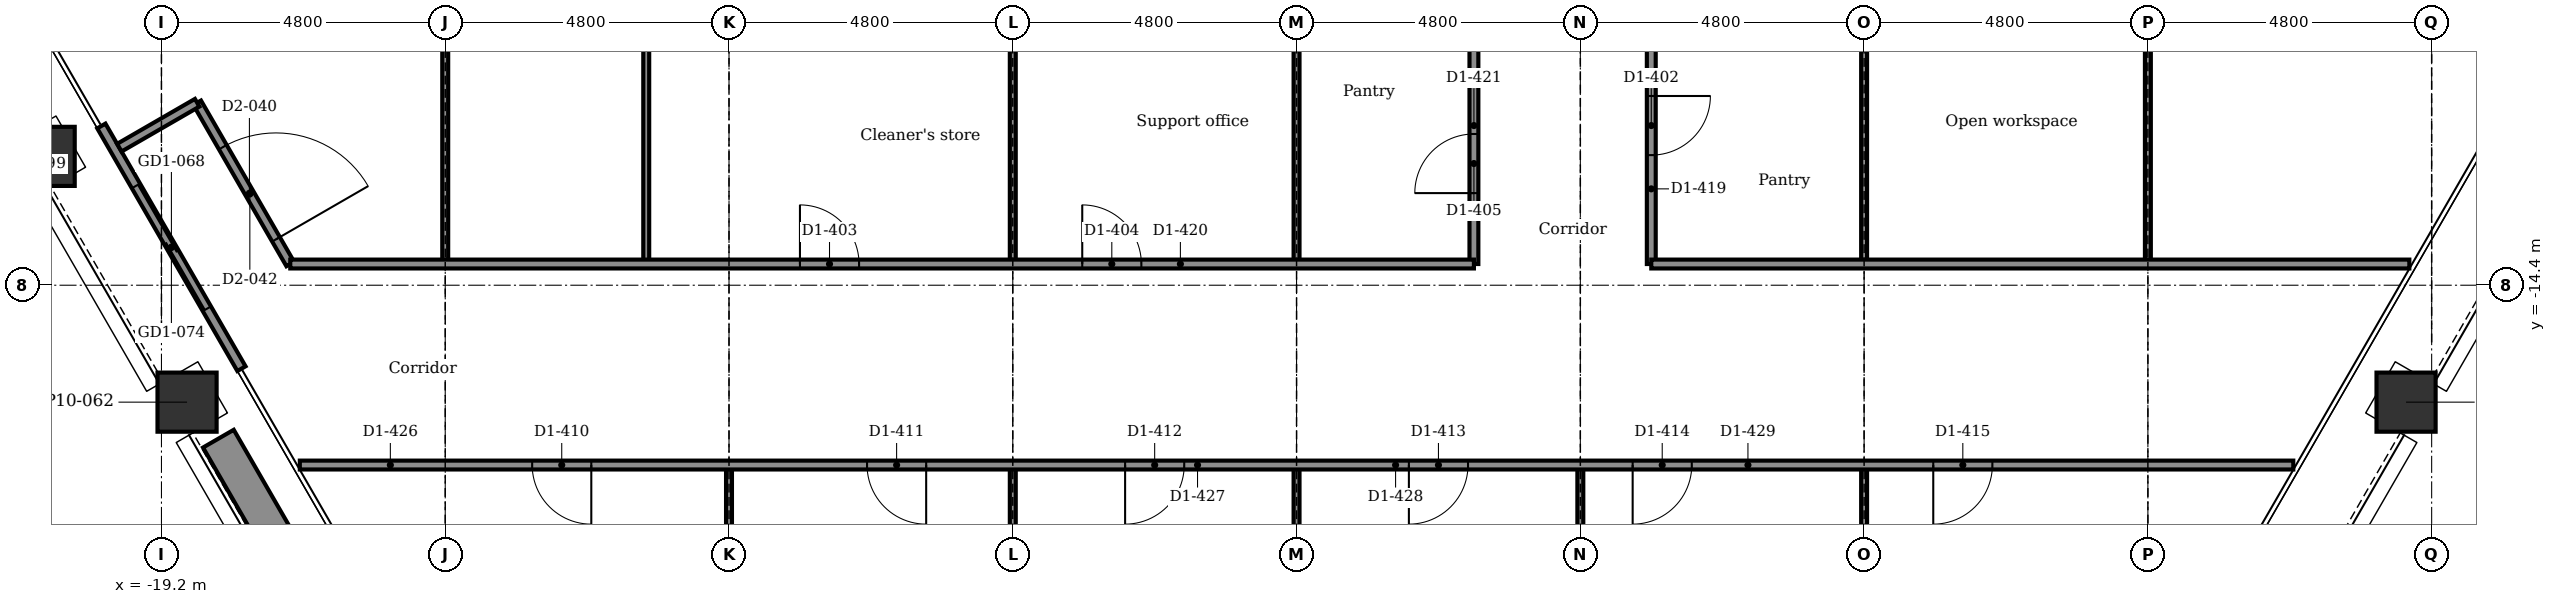
"""IFC4 building model, lengths in metres.
Left out: names, types, materials, properties, quantities, classifications, styles, units other than length and angle.
Written with IfcOpenShell. Run it as: python <this file> out.ifc"""

import sys

from ifc_helpers import new_model, si_unit, direction, frame, frame_2d, origin, origin_2d, place, context, subcontext, project, spatial, rectangle, extrude, element, fill, save


model = new_model("IFC4")
c1 = context("Model", 3, precision=1e-05, world=origin(), true_north=direction((0.0, 1.0)))
c2 = subcontext(c1, "Body", "Model", "MODEL_VIEW")
j1 = project(units=[si_unit("LENGTHUNIT", "METRE"), si_unit("PLANEANGLEUNIT", "RADIAN")], contexts=[c1])
p1 = place(None, origin())
s1 = spatial("IfcSite", under=j1, at=p1, CompositionType="ELEMENT")
p2 = place(p1, origin())
s2 = spatial("IfcBuilding", under=s1, at=p2, CompositionType="ELEMENT")
p3 = place(p2, frame((0.0, 0.0, 138.8)))
s3 = spatial("IfcBuildingStorey", under=s2, at=p3, CompositionType="ELEMENT", Elevation=138.8)
for number, where, z_axis, x_axis in (
    (1, (18.767, -16.378, -0.15), (0.0, 0.0, 1.0), (0.5, 0.866, 0.0)),
    (2, (-18.767, -16.378, -0.15), (0.0, 0.0, 1.0), (0.866, 0.5, 0.0)),
    (3, (-21.167, -12.221, -0.15), (0.0, 0.0, 1.0), (0.866, 0.5, 0.0)),
):
    element("IfcColumn", number, at=place(p3, frame(where, z_axis=z_axis, x_axis=x_axis)), inside=s3, PredefinedType="COLUMN", context=c2, shape_type="SweptSolid", body=[
        extrude(rectangle(XDim=1.0, YDim=1.0, at=origin_2d()), origin(), (0.0, 0.0, 1.0), 3.9),
    ])
p4 = place(p3, frame((-17.847, -15.812, 0.0), z_axis=(0.0, 0.0, 1.0), x_axis=(-0.5000167099, 0.866015756104, 0.0)))
e4 = element("IfcWall", 4, at=p4, inside=s3, PredefinedType="PARTITIONING", context=c2, shape_type="SweptSolid", body=[
    extrude(rectangle(XDim=4.74, YDim=0.16, at=frame_2d((2.37, 0.0))), origin(), (0.0, 0.0, 1.0), 3.75),
])
p5 = place(p4, frame((1.17, 0.0, 0.0)))
e5 = element("IfcOpeningElement", 5, at=p5, cuts=e4, PredefinedType="OPENING", context=c2, shape_type="SweptSolid", body=[
    extrude(rectangle(XDim=2.4, YDim=2.4, at=frame_2d((1.2, 1.2))), frame((0.0, 0.09, 0.0), z_axis=(0.0, -1.0, 0.0), x_axis=(1.0, 0.0, 0.0)), (0.0, 0.0, 1.0), 0.18),
])
p6 = place(p3, frame((-16.637, -19.767, 0.0), z_axis=(0.0, 0.0, 1.0), x_axis=(-0.500028443584, 0.866008981251, 0.0)))
e6 = element("IfcWall", 6, at=p6, inside=s3, PredefinedType="USERDEFINED", context=c2, shape_type="SweptSolid", body=[
    extrude(rectangle(XDim=3.2, YDim=0.6, at=frame_2d((1.6, 0.0))), origin(), (0.0, 0.0, 1.0), 0.7),
])
p7 = place(p3, frame((14.4, -14.042, 0.0), z_axis=(0.0, 0.0, 1.0), x_axis=(0.0, 1.0, 0.0)))
e7 = element("IfcWall", 7, at=p7, inside=s3, PredefinedType="PARTITIONING", context=c2, shape_type="SweptSolid", body=[
    extrude(rectangle(XDim=4.348, YDim=0.1, at=frame_2d((2.174, 0.0))), origin(), (0.0, 0.0, 1.0), 3.066),
])
p8 = place(p3, frame((9.6, -23.271, 0.0), z_axis=(0.0, 0.0, 1.0), x_axis=(0.0, 1.0, 0.0)))
e8 = element("IfcWall", 8, at=p8, inside=s3, PredefinedType="PARTITIONING", context=c2, shape_type="SweptSolid", body=[
    extrude(rectangle(XDim=5.83, YDim=0.1, at=frame_2d((2.915, 0.0))), origin(), (0.0, 0.0, 1.0), 3.066),
])
p9 = place(p3, frame((9.6, -14.042, 0.0), z_axis=(0.0, 0.0, 1.0), x_axis=(0.0, 1.0, 0.0)))
e9 = element("IfcWall", 9, at=p9, inside=s3, PredefinedType="PARTITIONING", context=c2, shape_type="SweptSolid", body=[
    extrude(rectangle(XDim=3.892, YDim=0.1, at=frame_2d((1.946, 0.0))), origin(), (0.0, 0.0, 1.0), 3.066),
])
p10 = place(p3, frame((6.0, -14.042, 0.0), z_axis=(0.0, 0.0, 1.0), x_axis=(0.0, 1.0, 0.0)))
e10 = element("IfcWall", 10, at=p10, inside=s3, PredefinedType="PARTITIONING", context=c2, shape_type="SweptSolid", body=[
    extrude(rectangle(XDim=3.892, YDim=0.15, at=frame_2d((1.946, 0.0))), origin(), (0.0, 0.0, 1.0), 3.75),
])
p11 = place(p10, frame((1.842, 0.0, 0.0)))
e11 = element("IfcOpeningElement", 11, at=p11, cuts=e10, PredefinedType="OPENING", context=c2, shape_type="SweptSolid", body=[
    extrude(rectangle(XDim=1.0, YDim=2.1, at=frame_2d((0.5, 1.05))), frame((0.0, 0.085, 0.0), z_axis=(0.0, -1.0, 0.0), x_axis=(1.0, 0.0, 0.0)), (0.0, 0.0, 1.0), 0.17),
])
p12 = place(p3, frame((4.8, -23.281, 0.0), z_axis=(0.0, 0.0, 1.0), x_axis=(0.0, 1.0, 0.0)))
e12 = element("IfcWall", 12, at=p12, inside=s3, PredefinedType="PARTITIONING", context=c2, shape_type="SweptSolid", body=[
    extrude(rectangle(XDim=5.84, YDim=0.1, at=frame_2d((2.92, 0.0))), origin(), (0.0, 0.0, 1.0), 3.066),
])
p13 = place(p3, frame((3.0, -14.042, 0.0), z_axis=(0.0, 0.0, 1.0), x_axis=(0.0, 1.0, 0.0)))
e13 = element("IfcWall", 13, at=p13, inside=s3, PredefinedType="PARTITIONING", context=c2, shape_type="SweptSolid", body=[
    extrude(rectangle(XDim=4.092, YDim=0.15, at=frame_2d((2.046, 0.0))), origin(), (0.0, 0.0, 1.0), 3.75),
])
p14 = place(p13, frame((1.199, 0.0, 0.0)))
e14 = element("IfcOpeningElement", 14, at=p14, cuts=e13, PredefinedType="OPENING", context=c2, shape_type="SweptSolid", body=[
    extrude(rectangle(XDim=1.0, YDim=2.1, at=frame_2d((0.5, 1.05))), frame((0.0, 0.085, 0.0), z_axis=(0.0, -1.0, 0.0), x_axis=(1.0, 0.0, 0.0)), (0.0, 0.0, 1.0), 0.17),
])
p15 = place(p3, frame((0.0, -23.281, 0.0), z_axis=(0.0, 0.0, 1.0), x_axis=(0.0, 1.0, 0.0)))
e15 = element("IfcWall", 15, at=p15, inside=s3, PredefinedType="PARTITIONING", context=c2, shape_type="SweptSolid", body=[
    extrude(rectangle(XDim=5.84, YDim=0.1, at=frame_2d((2.92, 0.0))), origin(), (0.0, 0.0, 1.0), 3.066),
])
p16 = place(p3, frame((0.0, -14.042, 0.0), z_axis=(0.0, 0.0, 1.0), x_axis=(0.0, 1.0, 0.0)))
e16 = element("IfcWall", 16, at=p16, inside=s3, PredefinedType="PARTITIONING", context=c2, shape_type="SweptSolid", body=[
    extrude(rectangle(XDim=4.092, YDim=0.1, at=frame_2d((2.046, 0.0))), origin(), (0.0, 0.0, 1.0), 3.066),
])
p17 = place(p3, frame((-4.8, -23.271, 0.0), z_axis=(0.0, 0.0, 1.0), x_axis=(0.0, 1.0, 0.0)))
e17 = element("IfcWall", 17, at=p17, inside=s3, PredefinedType="PARTITIONING", context=c2, shape_type="SweptSolid", body=[
    extrude(rectangle(XDim=5.83, YDim=0.1, at=frame_2d((2.915, 0.0))), origin(), (0.0, 0.0, 1.0), 3.066),
])
p18 = place(p3, frame((-4.8, -14.042, 0.0), z_axis=(0.0, 0.0, 1.0), x_axis=(0.0, 1.0, 0.0)))
e18 = element("IfcWall", 18, at=p18, inside=s3, PredefinedType="PARTITIONING", context=c2, shape_type="SweptSolid", body=[
    extrude(rectangle(XDim=4.092, YDim=0.1, at=frame_2d((2.046, 0.0))), origin(), (0.0, 0.0, 1.0), 3.066),
])
p19 = place(p3, frame((-9.6, -23.271, 0.0), z_axis=(0.0, 0.0, 1.0), x_axis=(0.0, 1.0, 0.0)))
e19 = element("IfcWall", 19, at=p19, inside=s3, PredefinedType="PARTITIONING", context=c2, shape_type="SweptSolid", body=[
    extrude(rectangle(XDim=5.83, YDim=0.1, at=frame_2d((2.915, 0.0))), origin(), (0.0, 0.0, 1.0), 3.066),
])
p20 = place(p3, frame((-11.0, -14.042, 0.0), z_axis=(0.0, 0.0, 1.0), x_axis=(0.0, 1.0, 0.0)))
e20 = element("IfcWall", 20, at=p20, inside=s3, PredefinedType="PARTITIONING", context=c2, shape_type="SweptSolid", body=[
    extrude(rectangle(XDim=4.042, YDim=0.1, at=frame_2d((2.021, 0.0))), origin(), (0.0, 0.0, 1.0), 3.75),
])
p21 = place(p3, frame((-14.4, -14.042, 0.0), z_axis=(0.0, 0.0, 1.0), x_axis=(0.0, 1.0, 0.0)))
e21 = element("IfcWall", 21, at=p21, inside=s3, PredefinedType="PARTITIONING", context=c2, shape_type="SweptSolid", body=[
    extrude(rectangle(XDim=4.348, YDim=0.1, at=frame_2d((2.174, 0.0))), origin(), (0.0, 0.0, 1.0), 3.066),
])
p22 = place(p3, frame((-18.596, -11.314, 0.0), z_axis=(0.0, 0.0, 1.0), x_axis=(0.499957296199, -0.866050057432, 0.0)))
e22 = element("IfcWall", 22, at=p22, inside=s3, PredefinedType="PARTITIONING", context=c2, shape_type="SweptSolid", body=[
    extrude(rectangle(XDim=3.15, YDim=0.15, at=frame_2d((1.575, 0.0))), origin(), (0.0, 0.0, 1.0), 3.75),
])
p23 = place(p22, frame((0.867, 0.0, 0.0)))
e23 = element("IfcOpeningElement", 23, at=p23, cuts=e22, PredefinedType="OPENING", context=c2, shape_type="SweptSolid", body=[
    extrude(rectangle(XDim=1.8, YDim=2.1, at=frame_2d((0.9, 1.05))), frame((0.0, 0.085, 0.0), z_axis=(0.0, -1.0, 0.0), x_axis=(1.0, 0.0, 0.0)), (0.0, 0.0, 1.0), 0.17),
])
p24 = place(p3, frame((-19.912, -12.074, 0.0), z_axis=(0.0, 0.0, 1.0), x_axis=(0.866030456496, 0.499991248344, 0.0)))
e24 = element("IfcWall", 24, at=p24, inside=s3, PredefinedType="PARTITIONING", context=c2, shape_type="SweptSolid", body=[
    extrude(rectangle(XDim=1.52, YDim=0.15, at=frame_2d((0.76, 0.0))), origin(), (0.0, 0.0, 1.0), 3.75),
])
p25 = place(p3, frame((-16.86, -17.441, 0.0), z_axis=(0.0, 0.0, 1.0), x_axis=(1.0, 0.0, 0.0)))
e25 = element("IfcWall", 25, at=p25, inside=s3, PredefinedType="PARTITIONING", context=c2, shape_type="SweptSolid", body=[
    extrude(rectangle(XDim=33.719, YDim=0.15, at=frame_2d((16.86, 0.0))), origin(), (0.0, 0.0, 1.0), 3.75),
])
p26 = place(p25, frame((3.93, 0.0, 0.0)))
e26 = element("IfcOpeningElement", 26, at=p26, cuts=e25, PredefinedType="OPENING", context=c2, shape_type="SweptSolid", body=[
    extrude(rectangle(XDim=1.0, YDim=2.1, at=frame_2d((0.5, 1.05))), frame((0.0, 0.085, 0.0), z_axis=(0.0, -1.0, 0.0), x_axis=(1.0, 0.0, 0.0)), (0.0, 0.0, 1.0), 0.17),
])
p27 = place(p25, frame((9.594, 0.0, 0.0)))
e27 = element("IfcOpeningElement", 27, at=p27, cuts=e25, PredefinedType="OPENING", context=c2, shape_type="SweptSolid", body=[
    extrude(rectangle(XDim=1.0, YDim=2.1, at=frame_2d((0.5, 1.05))), frame((0.0, 0.085, 0.0), z_axis=(0.0, -1.0, 0.0), x_axis=(1.0, 0.0, 0.0)), (0.0, 0.0, 1.0), 0.17),
])
p28 = place(p25, frame((13.959, 0.0, 0.0)))
e28 = element("IfcOpeningElement", 28, at=p28, cuts=e25, PredefinedType="OPENING", context=c2, shape_type="SweptSolid", body=[
    extrude(rectangle(XDim=1.0, YDim=2.1, at=frame_2d((0.5, 1.05))), frame((0.0, 0.085, 0.0), z_axis=(0.0, -1.0, 0.0), x_axis=(1.0, 0.0, 0.0)), (0.0, 0.0, 1.0), 0.17),
])
p29 = place(p25, frame((18.76, 0.0, 0.0)))
e29 = element("IfcOpeningElement", 29, at=p29, cuts=e25, PredefinedType="OPENING", context=c2, shape_type="SweptSolid", body=[
    extrude(rectangle(XDim=1.0, YDim=2.1, at=frame_2d((0.5, 1.05))), frame((0.0, 0.085, 0.0), z_axis=(0.0, -1.0, 0.0), x_axis=(1.0, 0.0, 0.0)), (0.0, 0.0, 1.0), 0.17),
])
p30 = place(p25, frame((22.544, 0.0, 0.0)))
e30 = element("IfcOpeningElement", 30, at=p30, cuts=e25, PredefinedType="OPENING", context=c2, shape_type="SweptSolid", body=[
    extrude(rectangle(XDim=1.0, YDim=2.1, at=frame_2d((0.5, 1.05))), frame((0.0, 0.085, 0.0), z_axis=(0.0, -1.0, 0.0), x_axis=(1.0, 0.0, 0.0)), (0.0, 0.0, 1.0), 0.17),
])
p31 = place(p25, frame((27.629, 0.0, 0.0)))
e31 = element("IfcOpeningElement", 31, at=p31, cuts=e25, PredefinedType="OPENING", context=c2, shape_type="SweptSolid", body=[
    extrude(rectangle(XDim=1.0, YDim=2.1, at=frame_2d((0.5, 1.05))), frame((0.0, 0.085, 0.0), z_axis=(0.0, -1.0, 0.0), x_axis=(1.0, 0.0, 0.0)), (0.0, 0.0, 1.0), 0.17),
])
p32 = place(p3, frame((-17.021, -14.042, 0.0), z_axis=(0.0, 0.0, 1.0), x_axis=(1.0, 0.0, 0.0)))
e32 = element("IfcWall", 32, at=p32, inside=s3, PredefinedType="PARTITIONING", context=c2, shape_type="SweptSolid", body=[
    extrude(rectangle(XDim=20.021, YDim=0.15, at=frame_2d((10.011, 0.0))), origin(), (0.0, 0.0, 1.0), 3.75),
])
p33 = place(p32, frame((8.621, 0.0, 0.0)))
e33 = element("IfcOpeningElement", 33, at=p33, cuts=e32, PredefinedType="OPENING", context=c2, shape_type="SweptSolid", body=[
    extrude(rectangle(XDim=1.0, YDim=2.1, at=frame_2d((0.5, 1.05))), frame((0.0, 0.085, 0.0), z_axis=(0.0, -1.0, 0.0), x_axis=(1.0, 0.0, 0.0)), (0.0, 0.0, 1.0), 0.17),
])
p34 = place(p32, frame((13.396, 0.0, 0.0)))
e34 = element("IfcOpeningElement", 34, at=p34, cuts=e32, PredefinedType="OPENING", context=c2, shape_type="SweptSolid", body=[
    extrude(rectangle(XDim=1.0, YDim=2.1, at=frame_2d((0.5, 1.05))), frame((0.0, 0.085, 0.0), z_axis=(0.0, -1.0, 0.0), x_axis=(1.0, 0.0, 0.0)), (0.0, 0.0, 1.0), 0.17),
])
p35 = place(p3, frame((6.0, -14.042, 0.0), z_axis=(0.0, 0.0, 1.0), x_axis=(1.0, 0.0, 0.0)))
e35 = element("IfcWall", 35, at=p35, inside=s3, PredefinedType="PARTITIONING", context=c2, shape_type="SweptSolid", body=[
    extrude(rectangle(XDim=12.823, YDim=0.15, at=frame_2d((6.411, 0.0))), origin(), (0.0, 0.0, 1.0), 3.75),
])
p36 = place(p5, origin())
e36 = element("IfcDoor", 36, at=p36, inside=s3, OperationType="DOUBLE_DOOR_SLIDING", PredefinedType="DOOR", context=c2, shape_type="SweptSolid", body=[
    extrude(rectangle(XDim=2.4, YDim=2.4, at=frame_2d((1.2, 1.2))), frame((0.0, 0.025, 0.0), z_axis=(0.0, -1.0, 0.0), x_axis=(1.0, 0.0, 0.0)), (0.0, 0.0, 1.0), 0.05),
])
fill(e5, e36)
p37 = place(p11, frame((1.0, 0.0, 0.0), z_axis=(0.0, 0.0, 1.0), x_axis=(-1.0, 0.0, 0.0)))
e37 = element("IfcDoor", 37, at=p37, inside=s3, OperationType="SINGLE_SWING_RIGHT", PredefinedType="DOOR", context=c2, shape_type="SweptSolid", body=[
    extrude(rectangle(XDim=1.0, YDim=2.1, at=frame_2d((0.5, 1.05))), frame((0.0, 0.025, 0.0), z_axis=(0.0, -1.0, 0.0), x_axis=(1.0, 0.0, 0.0)), (0.0, 0.0, 1.0), 0.05),
])
fill(e11, e37)
p38 = place(p33, origin())
e38 = element("IfcDoor", 38, at=p38, inside=s3, OperationType="SINGLE_SWING_LEFT", PredefinedType="DOOR", context=c2, shape_type="SweptSolid", body=[
    extrude(rectangle(XDim=1.0, YDim=2.1, at=frame_2d((0.5, 1.05))), frame((0.0, 0.025, 0.0), z_axis=(0.0, -1.0, 0.0), x_axis=(1.0, 0.0, 0.0)), (0.0, 0.0, 1.0), 0.05),
])
fill(e33, e38)
p39 = place(p34, origin())
e39 = element("IfcDoor", 39, at=p39, inside=s3, OperationType="SINGLE_SWING_LEFT", PredefinedType="DOOR", context=c2, shape_type="SweptSolid", body=[
    extrude(rectangle(XDim=1.0, YDim=2.1, at=frame_2d((0.5, 1.05))), frame((0.0, 0.025, 0.0), z_axis=(0.0, -1.0, 0.0), x_axis=(1.0, 0.0, 0.0)), (0.0, 0.0, 1.0), 0.05),
])
fill(e34, e39)
p40 = place(p14, origin())
e40 = element("IfcDoor", 40, at=p40, inside=s3, OperationType="SINGLE_SWING_LEFT", PredefinedType="DOOR", context=c2, shape_type="SweptSolid", body=[
    extrude(rectangle(XDim=1.0, YDim=2.1, at=frame_2d((0.5, 1.05))), frame((0.0, 0.025, 0.0), z_axis=(0.0, -1.0, 0.0), x_axis=(1.0, 0.0, 0.0)), (0.0, 0.0, 1.0), 0.05),
])
fill(e14, e40)
p41 = place(p26, frame((1.0, 0.0, 0.0), z_axis=(0.0, 0.0, 1.0), x_axis=(-1.0, 0.0, 0.0)))
e41 = element("IfcDoor", 41, at=p41, inside=s3, OperationType="SINGLE_SWING_RIGHT", PredefinedType="DOOR", context=c2, shape_type="SweptSolid", body=[
    extrude(rectangle(XDim=1.0, YDim=2.1, at=frame_2d((0.5, 1.05))), frame((0.0, 0.025, 0.0), z_axis=(0.0, -1.0, 0.0), x_axis=(1.0, 0.0, 0.0)), (0.0, 0.0, 1.0), 0.05),
])
fill(e26, e41)
p42 = place(p27, frame((1.0, 0.0, 0.0), z_axis=(0.0, 0.0, 1.0), x_axis=(-1.0, 0.0, 0.0)))
e42 = element("IfcDoor", 42, at=p42, inside=s3, OperationType="SINGLE_SWING_RIGHT", PredefinedType="DOOR", context=c2, shape_type="SweptSolid", body=[
    extrude(rectangle(XDim=1.0, YDim=2.1, at=frame_2d((0.5, 1.05))), frame((0.0, 0.025, 0.0), z_axis=(0.0, -1.0, 0.0), x_axis=(1.0, 0.0, 0.0)), (0.0, 0.0, 1.0), 0.05),
])
fill(e27, e42)
p43 = place(p28, frame((1.0, 0.0, 0.0), z_axis=(0.0, 0.0, 1.0), x_axis=(-1.0, 0.0, 0.0)))
e43 = element("IfcDoor", 43, at=p43, inside=s3, OperationType="SINGLE_SWING_LEFT", PredefinedType="DOOR", context=c2, shape_type="SweptSolid", body=[
    extrude(rectangle(XDim=1.0, YDim=2.1, at=frame_2d((0.5, 1.05))), frame((0.0, 0.025, 0.0), z_axis=(0.0, -1.0, 0.0), x_axis=(1.0, 0.0, 0.0)), (0.0, 0.0, 1.0), 0.05),
])
fill(e28, e43)
p44 = place(p29, frame((1.0, 0.0, 0.0), z_axis=(0.0, 0.0, 1.0), x_axis=(-1.0, 0.0, 0.0)))
e44 = element("IfcDoor", 44, at=p44, inside=s3, OperationType="SINGLE_SWING_LEFT", PredefinedType="DOOR", context=c2, shape_type="SweptSolid", body=[
    extrude(rectangle(XDim=1.0, YDim=2.1, at=frame_2d((0.5, 1.05))), frame((0.0, 0.025, 0.0), z_axis=(0.0, -1.0, 0.0), x_axis=(1.0, 0.0, 0.0)), (0.0, 0.0, 1.0), 0.05),
])
fill(e29, e44)
p45 = place(p30, frame((1.0, 0.0, 0.0), z_axis=(0.0, 0.0, 1.0), x_axis=(-1.0, 0.0, 0.0)))
e45 = element("IfcDoor", 45, at=p45, inside=s3, OperationType="SINGLE_SWING_LEFT", PredefinedType="DOOR", context=c2, shape_type="SweptSolid", body=[
    extrude(rectangle(XDim=1.0, YDim=2.1, at=frame_2d((0.5, 1.05))), frame((0.0, 0.025, 0.0), z_axis=(0.0, -1.0, 0.0), x_axis=(1.0, 0.0, 0.0)), (0.0, 0.0, 1.0), 0.05),
])
fill(e30, e45)
p46 = place(p31, frame((1.0, 0.0, 0.0), z_axis=(0.0, 0.0, 1.0), x_axis=(-1.0, 0.0, 0.0)))
e46 = element("IfcDoor", 46, at=p46, inside=s3, OperationType="SINGLE_SWING_LEFT", PredefinedType="DOOR", context=c2, shape_type="SweptSolid", body=[
    extrude(rectangle(XDim=1.0, YDim=2.1, at=frame_2d((0.5, 1.05))), frame((0.0, 0.025, 0.0), z_axis=(0.0, -1.0, 0.0), x_axis=(1.0, 0.0, 0.0)), (0.0, 0.0, 1.0), 0.05),
])
fill(e31, e46)
p47 = place(p23, origin())
e47 = element("IfcDoor", 47, at=p47, inside=s3, OperationType="SINGLE_SWING_RIGHT", PredefinedType="DOOR", context=c2, shape_type="SweptSolid", body=[
    extrude(rectangle(XDim=1.8, YDim=2.1, at=frame_2d((0.9, 1.05))), frame((0.0, 0.025, 0.0), z_axis=(0.0, -1.0, 0.0), x_axis=(1.0, 0.0, 0.0)), (0.0, 0.0, 1.0), 0.05),
])
fill(e23, e47)
save(model, sys.argv[1])
